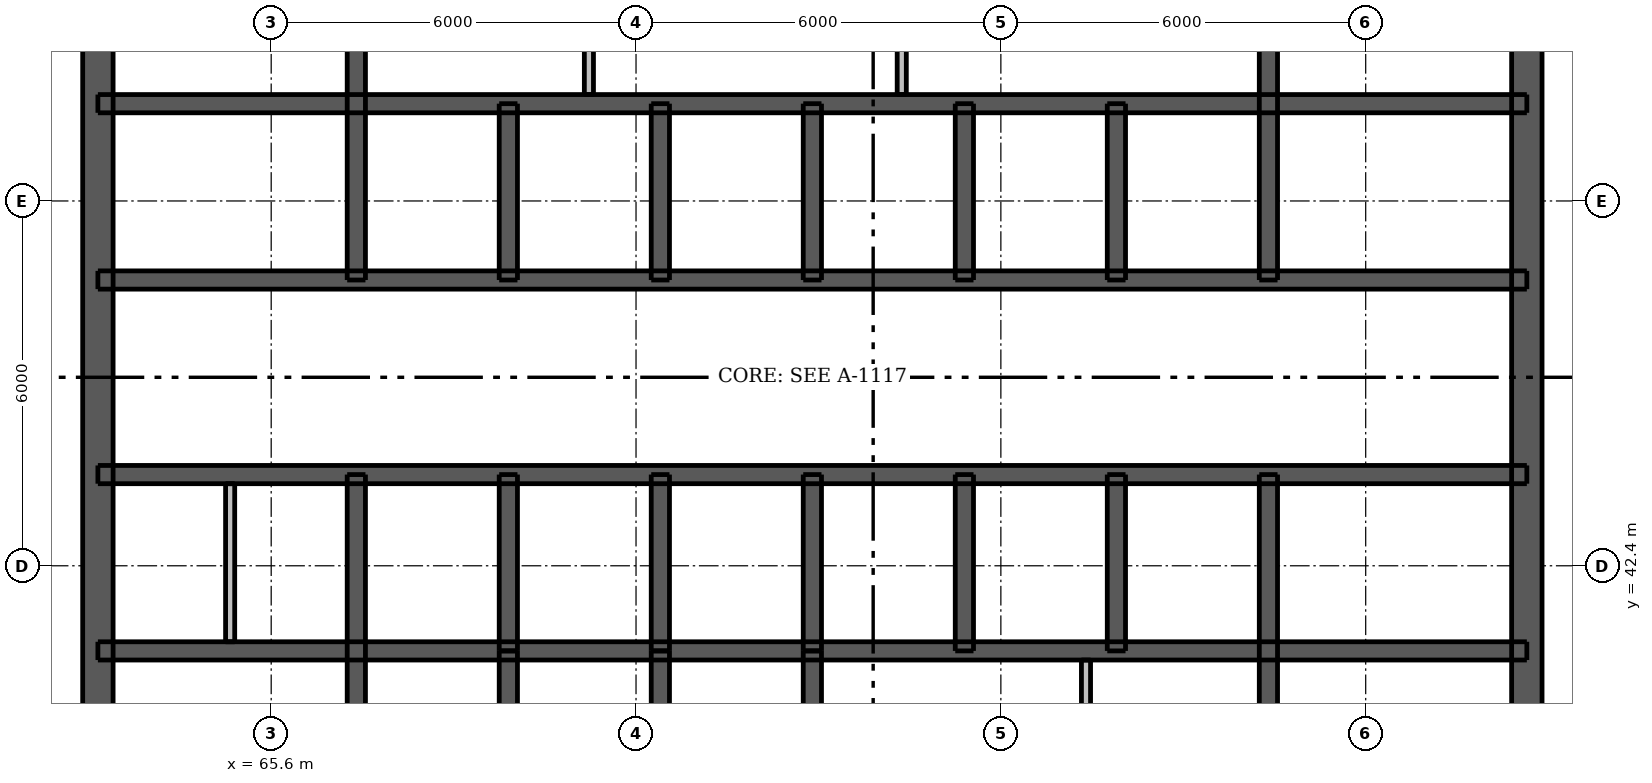
"""IFC4 building model, lengths in metres.
Left out: names, types, materials, properties, quantities, classifications, styles, units other than length and angle.
Written with IfcOpenShell. Run it as: python <this file> out.ifc"""

import sys

from ifc_helpers import new_model, si_unit, direction, frame, frame_2d, origin, place, context, subcontext, project, spatial, rectangle, extrude, element, fill, save


model = new_model("IFC4")
c1 = context("Model", 3, precision=1e-05, world=origin(), true_north=direction((0.0, 1.0)))
c2 = subcontext(c1, "Body", "Model", "MODEL_VIEW")
j1 = project(units=[si_unit("LENGTHUNIT", "METRE"), si_unit("PLANEANGLEUNIT", "RADIAN")], contexts=[c1])
p1 = place(None, origin())
s1 = spatial("IfcSite", under=j1, at=p1, CompositionType="ELEMENT")
p2 = place(p1, origin())
s2 = spatial("IfcBuilding", under=s1, at=p2, CompositionType="ELEMENT")
p3 = place(p2, frame((0.0, 0.0, 255.4)))
s3 = spatial("IfcBuildingStorey", under=s2, at=p3, CompositionType="ELEMENT", Elevation=255.4)
p4 = place(p3, frame((62.75, 33.5, 0.0), z_axis=(0.0, 0.0, 1.0), x_axis=(0.0, 1.0, 0.0)))
e1 = element("IfcWall", 1, at=p4, inside=s3, PredefinedType="SHEAR", context=c2, shape_type="SweptSolid", body=[
    extrude(rectangle(XDim=24.0, YDim=0.5, at=frame_2d((12.0, 0.0))), origin(), (0.0, 0.0, 1.0), 3.05),
])
p5 = place(p4, frame((11.2, 0.0, 0.0)))
e2 = element("IfcOpeningElement", 2, at=p5, cuts=e1, PredefinedType="OPENING", context=c2, shape_type="SweptSolid", body=[
    extrude(rectangle(XDim=1.6, YDim=2.1, at=frame_2d((0.8, 1.05))), frame((0.0, 0.26, 0.0), z_axis=(0.0, -1.0, 0.0), x_axis=(1.0, 0.0, 0.0)), (0.0, 0.0, 1.0), 0.52),
])
p6 = place(p3, frame((86.25, 33.5, 0.0), z_axis=(0.0, 0.0, 1.0), x_axis=(0.0, 1.0, 0.0)))
e3 = element("IfcWall", 3, at=p6, inside=s3, PredefinedType="SHEAR", context=c2, shape_type="SweptSolid", body=[
    extrude(rectangle(XDim=24.0, YDim=0.5, at=frame_2d((12.0, 0.0))), origin(), (0.0, 0.0, 1.0), 3.05),
])
p7 = place(p6, frame((11.2, 0.0, 0.0)))
e4 = element("IfcOpeningElement", 4, at=p7, cuts=e3, PredefinedType="OPENING", context=c2, shape_type="SweptSolid", body=[
    extrude(rectangle(XDim=1.6, YDim=2.1, at=frame_2d((0.8, 1.05))), frame((0.0, 0.26, 0.0), z_axis=(0.0, -1.0, 0.0), x_axis=(1.0, 0.0, 0.0)), (0.0, 0.0, 1.0), 0.52),
])
p8 = place(p3, frame((62.75, 41.0, 0.0), z_axis=(0.0, 0.0, 1.0), x_axis=(1.0, 0.0, 0.0)))
e5 = element("IfcWall", 5, at=p8, inside=s3, PredefinedType="SHEAR", context=c2, shape_type="SweptSolid", body=[
    extrude(rectangle(XDim=23.5, YDim=0.3, at=frame_2d((11.75, 0.0))), origin(), (0.0, 0.0, 1.0), 3.05),
])
p9 = place(p3, frame((62.75, 43.9, 0.0), z_axis=(0.0, 0.0, 1.0), x_axis=(1.0, 0.0, 0.0)))
e6 = element("IfcWall", 6, at=p9, inside=s3, PredefinedType="SHEAR", context=c2, shape_type="SweptSolid", body=[
    extrude(rectangle(XDim=23.5, YDim=0.3, at=frame_2d((11.75, 0.0))), origin(), (0.0, 0.0, 1.0), 3.05),
])
p10 = place(p9, frame((0.762, 0.0, 0.0)))
e7 = element("IfcOpeningElement", 7, at=p10, cuts=e6, PredefinedType="OPENING", context=c2, shape_type="SweptSolid", body=[
    extrude(rectangle(XDim=0.9, YDim=2.1, at=frame_2d((0.45, 1.05))), frame((0.0, 0.16, 0.0), z_axis=(0.0, -1.0, 0.0), x_axis=(1.0, 0.0, 0.0)), (0.0, 0.0, 1.0), 0.32),
])
p11 = place(p9, frame((2.688, 0.0, 0.0)))
e8 = element("IfcOpeningElement", 8, at=p11, cuts=e6, PredefinedType="OPENING", context=c2, shape_type="SweptSolid", body=[
    extrude(rectangle(XDim=0.9, YDim=2.1, at=frame_2d((0.45, 1.05))), frame((0.0, 0.16, 0.0), z_axis=(0.0, -1.0, 0.0), x_axis=(1.0, 0.0, 0.0)), (0.0, 0.0, 1.0), 0.32),
])
p12 = place(p9, frame((20.875, 0.0, 0.0)))
e9 = element("IfcOpeningElement", 9, at=p12, cuts=e6, PredefinedType="OPENING", context=c2, shape_type="SweptSolid", body=[
    extrude(rectangle(XDim=0.9, YDim=2.1, at=frame_2d((0.45, 1.05))), frame((0.0, 0.16, 0.0), z_axis=(0.0, -1.0, 0.0), x_axis=(1.0, 0.0, 0.0)), (0.0, 0.0, 1.0), 0.32),
])
p13 = place(p9, frame((5.05, 0.0, 0.0)))
e10 = element("IfcOpeningElement", 10, at=p13, cuts=e6, PredefinedType="OPENING", context=c2, shape_type="SweptSolid", body=[
    extrude(rectangle(XDim=0.9, YDim=2.1, at=frame_2d((0.45, 1.05))), frame((0.0, 0.16, 0.0), z_axis=(0.0, -1.0, 0.0), x_axis=(1.0, 0.0, 0.0)), (0.0, 0.0, 1.0), 0.32),
])
p14 = place(p9, frame((7.55, 0.0, 0.0)))
e11 = element("IfcOpeningElement", 11, at=p14, cuts=e6, PredefinedType="OPENING", context=c2, shape_type="SweptSolid", body=[
    extrude(rectangle(XDim=0.9, YDim=2.1, at=frame_2d((0.45, 1.05))), frame((0.0, 0.16, 0.0), z_axis=(0.0, -1.0, 0.0), x_axis=(1.0, 0.0, 0.0)), (0.0, 0.0, 1.0), 0.32),
])
p15 = place(p9, frame((12.55, 0.0, 0.0)))
e12 = element("IfcOpeningElement", 12, at=p15, cuts=e6, PredefinedType="OPENING", context=c2, shape_type="SweptSolid", body=[
    extrude(rectangle(XDim=0.9, YDim=2.1, at=frame_2d((0.45, 1.05))), frame((0.0, 0.16, 0.0), z_axis=(0.0, -1.0, 0.0), x_axis=(1.0, 0.0, 0.0)), (0.0, 0.0, 1.0), 0.32),
])
p16 = place(p9, frame((15.05, 0.0, 0.0)))
e13 = element("IfcOpeningElement", 13, at=p16, cuts=e6, PredefinedType="OPENING", context=c2, shape_type="SweptSolid", body=[
    extrude(rectangle(XDim=0.9, YDim=2.1, at=frame_2d((0.45, 1.05))), frame((0.0, 0.16, 0.0), z_axis=(0.0, -1.0, 0.0), x_axis=(1.0, 0.0, 0.0)), (0.0, 0.0, 1.0), 0.32),
])
p17 = place(p3, frame((62.75, 47.1, 0.0), z_axis=(0.0, 0.0, 1.0), x_axis=(1.0, 0.0, 0.0)))
e14 = element("IfcWall", 14, at=p17, inside=s3, PredefinedType="SHEAR", context=c2, shape_type="SweptSolid", body=[
    extrude(rectangle(XDim=23.5, YDim=0.3, at=frame_2d((11.75, 0.0))), origin(), (0.0, 0.0, 1.0), 3.05),
])
p18 = place(p17, frame((1.725, 0.0, 0.0)))
e15 = element("IfcOpeningElement", 15, at=p18, cuts=e14, PredefinedType="OPENING", context=c2, shape_type="SweptSolid", body=[
    extrude(rectangle(XDim=0.9, YDim=2.1, at=frame_2d((0.45, 1.05))), frame((0.0, 0.16, 0.0), z_axis=(0.0, -1.0, 0.0), x_axis=(1.0, 0.0, 0.0)), (0.0, 0.0, 1.0), 0.32),
])
p19 = place(p17, frame((20.875, 0.0, 0.0)))
e16 = element("IfcOpeningElement", 16, at=p19, cuts=e14, PredefinedType="OPENING", context=c2, shape_type="SweptSolid", body=[
    extrude(rectangle(XDim=0.9, YDim=2.1, at=frame_2d((0.45, 1.05))), frame((0.0, 0.16, 0.0), z_axis=(0.0, -1.0, 0.0), x_axis=(1.0, 0.0, 0.0)), (0.0, 0.0, 1.0), 0.32),
])
p20 = place(p17, frame((4.95, 0.0, 0.0)))
e17 = element("IfcOpeningElement", 17, at=p20, cuts=e14, PredefinedType="OPENING", context=c2, shape_type="SweptSolid", body=[
    extrude(rectangle(XDim=1.1, YDim=2.1, at=frame_2d((0.55, 1.05))), frame((0.0, 0.16, 0.0), z_axis=(0.0, -1.0, 0.0), x_axis=(1.0, 0.0, 0.0)), (0.0, 0.0, 1.0), 0.32),
])
p21 = place(p17, frame((7.45, 0.0, 0.0)))
e18 = element("IfcOpeningElement", 18, at=p21, cuts=e14, PredefinedType="OPENING", context=c2, shape_type="SweptSolid", body=[
    extrude(rectangle(XDim=1.1, YDim=2.1, at=frame_2d((0.55, 1.05))), frame((0.0, 0.16, 0.0), z_axis=(0.0, -1.0, 0.0), x_axis=(1.0, 0.0, 0.0)), (0.0, 0.0, 1.0), 0.32),
])
p22 = place(p17, frame((9.95, 0.0, 0.0)))
e19 = element("IfcOpeningElement", 19, at=p22, cuts=e14, PredefinedType="OPENING", context=c2, shape_type="SweptSolid", body=[
    extrude(rectangle(XDim=1.1, YDim=2.1, at=frame_2d((0.55, 1.05))), frame((0.0, 0.16, 0.0), z_axis=(0.0, -1.0, 0.0), x_axis=(1.0, 0.0, 0.0)), (0.0, 0.0, 1.0), 0.32),
])
p23 = place(p17, frame((12.45, 0.0, 0.0)))
e20 = element("IfcOpeningElement", 20, at=p23, cuts=e14, PredefinedType="OPENING", context=c2, shape_type="SweptSolid", body=[
    extrude(rectangle(XDim=1.1, YDim=2.1, at=frame_2d((0.55, 1.05))), frame((0.0, 0.16, 0.0), z_axis=(0.0, -1.0, 0.0), x_axis=(1.0, 0.0, 0.0)), (0.0, 0.0, 1.0), 0.32),
])
p24 = place(p17, frame((14.95, 0.0, 0.0)))
e21 = element("IfcOpeningElement", 21, at=p24, cuts=e14, PredefinedType="OPENING", context=c2, shape_type="SweptSolid", body=[
    extrude(rectangle(XDim=1.1, YDim=2.1, at=frame_2d((0.55, 1.05))), frame((0.0, 0.16, 0.0), z_axis=(0.0, -1.0, 0.0), x_axis=(1.0, 0.0, 0.0)), (0.0, 0.0, 1.0), 0.32),
])
p25 = place(p17, frame((17.45, 0.0, 0.0)))
e22 = element("IfcOpeningElement", 22, at=p25, cuts=e14, PredefinedType="OPENING", context=c2, shape_type="SweptSolid", body=[
    extrude(rectangle(XDim=1.1, YDim=2.1, at=frame_2d((0.55, 1.05))), frame((0.0, 0.16, 0.0), z_axis=(0.0, -1.0, 0.0), x_axis=(1.0, 0.0, 0.0)), (0.0, 0.0, 1.0), 0.32),
])
p26 = place(p3, frame((62.75, 50.0, 0.0), z_axis=(0.0, 0.0, 1.0), x_axis=(1.0, 0.0, 0.0)))
e23 = element("IfcWall", 23, at=p26, inside=s3, PredefinedType="SHEAR", context=c2, shape_type="SweptSolid", body=[
    extrude(rectangle(XDim=23.5, YDim=0.3, at=frame_2d((11.75, 0.0))), origin(), (0.0, 0.0, 1.0), 3.05),
])
p27 = place(p3, frame((67.0, 33.75, 0.0), z_axis=(0.0, 0.0, 1.0), x_axis=(0.0, 1.0, 0.0)))
e24 = element("IfcWall", 24, at=p27, inside=s3, PredefinedType="SHEAR", context=c2, shape_type="SweptSolid", body=[
    extrude(rectangle(XDim=10.15, YDim=0.3, at=frame_2d((5.075, 0.0))), origin(), (0.0, 0.0, 1.0), 3.05),
])
p28 = place(p27, frame((0.45, 0.0, 0.0)))
e25 = element("IfcOpeningElement", 25, at=p28, cuts=e24, PredefinedType="OPENING", context=c2, shape_type="SweptSolid", body=[
    extrude(rectangle(XDim=1.1, YDim=2.1, at=frame_2d((0.55, 1.05))), frame((0.0, 0.16, 0.0), z_axis=(0.0, -1.0, 0.0), x_axis=(1.0, 0.0, 0.0)), (0.0, 0.0, 1.0), 0.32),
])
for number, where, z_axis, x_axis in (
    (26, (67.0, 47.1, 0.0), (0.0, 0.0, 1.0), (0.0, 1.0, 0.0)),
    (27, (82.0, 33.75, 0.0), (0.0, 0.0, 1.0), (0.0, 1.0, 0.0)),
    (28, (82.0, 47.1, 0.0), (0.0, 0.0, 1.0), (0.0, 1.0, 0.0)),
):
    element("IfcWall", number, at=place(p3, frame(where, z_axis=z_axis, x_axis=x_axis)), inside=s3, PredefinedType="SHEAR", context=c2, shape_type="SweptSolid", body=[
        extrude(rectangle(XDim=10.15, YDim=0.3, at=frame_2d((5.075, 0.0))), origin(), (0.0, 0.0, 1.0), 3.05),
    ])
for number, where, z_axis, x_axis in (
    (29, (69.5, 41.0, 0.0), (0.0, 0.0, 1.0), (0.0, 1.0, 0.0)),
    (30, (69.5, 47.1, 0.0), (0.0, 0.0, 1.0), (0.0, 1.0, 0.0)),
    (31, (72.0, 41.0, 0.0), (0.0, 0.0, 1.0), (0.0, 1.0, 0.0)),
    (32, (72.0, 47.1, 0.0), (0.0, 0.0, 1.0), (0.0, 1.0, 0.0)),
    (33, (74.5, 41.0, 0.0), (0.0, 0.0, 1.0), (0.0, 1.0, 0.0)),
    (34, (74.5, 47.1, 0.0), (0.0, 0.0, 1.0), (0.0, 1.0, 0.0)),
    (35, (77.0, 41.0, 0.0), (0.0, 0.0, 1.0), (0.0, 1.0, 0.0)),
    (36, (77.0, 47.1, 0.0), (0.0, 0.0, 1.0), (0.0, 1.0, 0.0)),
    (37, (79.5, 41.0, 0.0), (0.0, 0.0, 1.0), (0.0, 1.0, 0.0)),
    (38, (79.5, 47.1, 0.0), (0.0, 0.0, 1.0), (0.0, 1.0, 0.0)),
    (39, (69.5, 38.1, 0.0), (0.0, 0.0, 1.0), (0.0, 1.0, 0.0)),
    (40, (72.0, 38.1, 0.0), (0.0, 0.0, 1.0), (0.0, 1.0, 0.0)),
    (41, (74.5, 38.1, 0.0), (0.0, 0.0, 1.0), (0.0, 1.0, 0.0)),
):
    element("IfcWall", number, at=place(p3, frame(where, z_axis=z_axis, x_axis=x_axis)), inside=s3, PredefinedType="SHEAR", context=c2, shape_type="SweptSolid", body=[
        extrude(rectangle(XDim=2.9, YDim=0.3, at=frame_2d((1.45, 0.0))), origin(), (0.0, 0.0, 1.0), 3.05),
    ])
p29 = place(p3, frame((79.0, 34.0, 0.0), z_axis=(0.0, 0.0, 1.0), x_axis=(0.0, 1.0, 0.0)))
e42 = element("IfcWall", 42, at=p29, inside=s3, PredefinedType="PLUMBINGWALL", context=c2, shape_type="SweptSolid", body=[
    extrude(rectangle(XDim=6.85, YDim=0.15, at=frame_2d((3.425, 0.0))), origin(), (0.0, 0.0, 1.0), 3.05),
])
p30 = place(p3, frame((64.925, 41.15, 0.0), z_axis=(0.0, 0.0, 1.0), x_axis=(0.0, 1.0, 0.0)))
e43 = element("IfcWall", 43, at=p30, inside=s3, PredefinedType="PLUMBINGWALL", context=c2, shape_type="SweptSolid", body=[
    extrude(rectangle(XDim=2.6, YDim=0.15, at=frame_2d((1.3, 0.0))), origin(), (0.0, 0.0, 1.0), 3.05),
])
for number, where, z_axis, x_axis in (
    (44, (70.825, 50.15, 0.0), (0.0, 0.0, 1.0), (0.0, 1.0, 0.0)),
    (45, (75.97, 50.15, 0.0), (0.0, 0.0, 1.0), (0.0, 1.0, 0.0)),
):
    element("IfcWall", number, at=place(p3, frame(where, z_axis=z_axis, x_axis=x_axis)), inside=s3, PredefinedType="PLUMBINGWALL", context=c2, shape_type="SweptSolid", body=[
        extrude(rectangle(XDim=6.85, YDim=0.15, at=frame_2d((3.425, 0.0))), origin(), (0.0, 0.0, 1.0), 3.05),
    ])
p31 = place(p5, origin())
e46 = element("IfcDoor", 46, at=p31, inside=s3, OperationType="DOUBLE_DOOR_SINGLE_SWING", PredefinedType="DOOR", context=c2, shape_type="SweptSolid", body=[
    extrude(rectangle(XDim=1.6, YDim=2.1, at=frame_2d((0.8, 1.05))), frame((0.0, -0.188, 0.0), z_axis=(0.0, -1.0, 0.0), x_axis=(1.0, 0.0, 0.0)), (0.0, 0.0, 1.0), 0.05),
])
fill(e2, e46)
p32 = place(p7, origin())
e47 = element("IfcDoor", 47, at=p32, inside=s3, OperationType="DOUBLE_DOOR_SINGLE_SWING", PredefinedType="DOOR", context=c2, shape_type="SweptSolid", body=[
    extrude(rectangle(XDim=1.6, YDim=2.1, at=frame_2d((0.8, 1.05))), frame((0.0, 0.237, 0.0), z_axis=(0.0, -1.0, 0.0), x_axis=(1.0, 0.0, 0.0)), (0.0, 0.0, 1.0), 0.05),
])
fill(e4, e47)
p33 = place(p10, origin())
e48 = element("IfcDoor", 48, at=p33, inside=s3, OperationType="SINGLE_SWING_LEFT", PredefinedType="DOOR", context=c2, shape_type="SweptSolid", body=[
    extrude(rectangle(XDim=0.9, YDim=2.1, at=frame_2d((0.45, 1.05))), frame((0.0, -0.087, 0.0), z_axis=(0.0, -1.0, 0.0), x_axis=(1.0, 0.0, 0.0)), (0.0, 0.0, 1.0), 0.05),
])
fill(e7, e48)
p34 = place(p11, origin())
e49 = element("IfcDoor", 49, at=p34, inside=s3, OperationType="SINGLE_SWING_RIGHT", PredefinedType="DOOR", context=c2, shape_type="SweptSolid", body=[
    extrude(rectangle(XDim=0.9, YDim=2.1, at=frame_2d((0.45, 1.05))), frame((0.0, -0.087, 0.0), z_axis=(0.0, -1.0, 0.0), x_axis=(1.0, 0.0, 0.0)), (0.0, 0.0, 1.0), 0.05),
])
fill(e8, e49)
p35 = place(p12, origin())
e50 = element("IfcDoor", 50, at=p35, inside=s3, OperationType="SINGLE_SWING_LEFT", PredefinedType="DOOR", context=c2, shape_type="SweptSolid", body=[
    extrude(rectangle(XDim=0.9, YDim=2.1, at=frame_2d((0.45, 1.05))), frame((0.0, -0.087, 0.0), z_axis=(0.0, -1.0, 0.0), x_axis=(1.0, 0.0, 0.0)), (0.0, 0.0, 1.0), 0.05),
])
fill(e9, e50)
p36 = place(p18, origin())
e51 = element("IfcDoor", 51, at=p36, inside=s3, OperationType="SINGLE_SWING_LEFT", PredefinedType="DOOR", context=c2, shape_type="SweptSolid", body=[
    extrude(rectangle(XDim=0.9, YDim=2.1, at=frame_2d((0.45, 1.05))), frame((0.0, 0.138, 0.0), z_axis=(0.0, -1.0, 0.0), x_axis=(1.0, 0.0, 0.0)), (0.0, 0.0, 1.0), 0.05),
])
fill(e15, e51)
p37 = place(p19, origin())
e52 = element("IfcDoor", 52, at=p37, inside=s3, OperationType="SINGLE_SWING_LEFT", PredefinedType="DOOR", context=c2, shape_type="SweptSolid", body=[
    extrude(rectangle(XDim=0.9, YDim=2.1, at=frame_2d((0.45, 1.05))), frame((0.0, 0.138, 0.0), z_axis=(0.0, -1.0, 0.0), x_axis=(1.0, 0.0, 0.0)), (0.0, 0.0, 1.0), 0.05),
])
fill(e16, e52)
p38 = place(p13, origin())
e53 = element("IfcDoor", 53, at=p38, inside=s3, OperationType="SINGLE_SWING_RIGHT", PredefinedType="DOOR", context=c2, shape_type="SweptSolid", body=[
    extrude(rectangle(XDim=0.9, YDim=2.1, at=frame_2d((0.45, 1.05))), frame((0.0, -0.087, 0.0), z_axis=(0.0, -1.0, 0.0), x_axis=(1.0, 0.0, 0.0)), (0.0, 0.0, 1.0), 0.05),
])
fill(e10, e53)
p39 = place(p14, origin())
e54 = element("IfcDoor", 54, at=p39, inside=s3, OperationType="SINGLE_SWING_LEFT", PredefinedType="DOOR", context=c2, shape_type="SweptSolid", body=[
    extrude(rectangle(XDim=0.9, YDim=2.1, at=frame_2d((0.45, 1.05))), frame((0.0, -0.087, 0.0), z_axis=(0.0, -1.0, 0.0), x_axis=(1.0, 0.0, 0.0)), (0.0, 0.0, 1.0), 0.05),
])
fill(e11, e54)
p40 = place(p15, origin())
e55 = element("IfcDoor", 55, at=p40, inside=s3, OperationType="SINGLE_SWING_LEFT", PredefinedType="DOOR", context=c2, shape_type="SweptSolid", body=[
    extrude(rectangle(XDim=0.9, YDim=2.1, at=frame_2d((0.45, 1.05))), frame((0.0, -0.087, 0.0), z_axis=(0.0, -1.0, 0.0), x_axis=(1.0, 0.0, 0.0)), (0.0, 0.0, 1.0), 0.05),
])
fill(e12, e55)
p41 = place(p16, origin())
e56 = element("IfcDoor", 56, at=p41, inside=s3, OperationType="SINGLE_SWING_RIGHT", PredefinedType="DOOR", context=c2, shape_type="SweptSolid", body=[
    extrude(rectangle(XDim=0.9, YDim=2.1, at=frame_2d((0.45, 1.05))), frame((0.0, -0.087, 0.0), z_axis=(0.0, -1.0, 0.0), x_axis=(1.0, 0.0, 0.0)), (0.0, 0.0, 1.0), 0.05),
])
fill(e13, e56)
p42 = place(p20, origin())
e57 = element("IfcDoor", 57, at=p42, inside=s3, OperationType="DOUBLE_DOOR_SLIDING", PredefinedType="DOOR", context=c2, shape_type="SweptSolid", body=[
    extrude(rectangle(XDim=1.1, YDim=2.1, at=frame_2d((0.55, 1.05))), frame((0.0, 0.025, 0.0), z_axis=(0.0, -1.0, 0.0), x_axis=(1.0, 0.0, 0.0)), (0.0, 0.0, 1.0), 0.05),
])
fill(e17, e57)
p43 = place(p21, origin())
e58 = element("IfcDoor", 58, at=p43, inside=s3, OperationType="DOUBLE_DOOR_SLIDING", PredefinedType="DOOR", context=c2, shape_type="SweptSolid", body=[
    extrude(rectangle(XDim=1.1, YDim=2.1, at=frame_2d((0.55, 1.05))), frame((0.0, 0.025, 0.0), z_axis=(0.0, -1.0, 0.0), x_axis=(1.0, 0.0, 0.0)), (0.0, 0.0, 1.0), 0.05),
])
fill(e18, e58)
p44 = place(p22, origin())
e59 = element("IfcDoor", 59, at=p44, inside=s3, OperationType="DOUBLE_DOOR_SLIDING", PredefinedType="DOOR", context=c2, shape_type="SweptSolid", body=[
    extrude(rectangle(XDim=1.1, YDim=2.1, at=frame_2d((0.55, 1.05))), frame((0.0, 0.025, 0.0), z_axis=(0.0, -1.0, 0.0), x_axis=(1.0, 0.0, 0.0)), (0.0, 0.0, 1.0), 0.05),
])
fill(e19, e59)
p45 = place(p23, origin())
e60 = element("IfcDoor", 60, at=p45, inside=s3, OperationType="DOUBLE_DOOR_SLIDING", PredefinedType="DOOR", context=c2, shape_type="SweptSolid", body=[
    extrude(rectangle(XDim=1.1, YDim=2.1, at=frame_2d((0.55, 1.05))), frame((0.0, 0.025, 0.0), z_axis=(0.0, -1.0, 0.0), x_axis=(1.0, 0.0, 0.0)), (0.0, 0.0, 1.0), 0.05),
])
fill(e20, e60)
p46 = place(p24, origin())
e61 = element("IfcDoor", 61, at=p46, inside=s3, OperationType="DOUBLE_DOOR_SLIDING", PredefinedType="DOOR", context=c2, shape_type="SweptSolid", body=[
    extrude(rectangle(XDim=1.1, YDim=2.1, at=frame_2d((0.55, 1.05))), frame((0.0, 0.025, 0.0), z_axis=(0.0, -1.0, 0.0), x_axis=(1.0, 0.0, 0.0)), (0.0, 0.0, 1.0), 0.05),
])
fill(e21, e61)
p47 = place(p25, origin())
e62 = element("IfcDoor", 62, at=p47, inside=s3, OperationType="DOUBLE_DOOR_SLIDING", PredefinedType="DOOR", context=c2, shape_type="SweptSolid", body=[
    extrude(rectangle(XDim=1.1, YDim=2.1, at=frame_2d((0.55, 1.05))), frame((0.0, 0.025, 0.0), z_axis=(0.0, -1.0, 0.0), x_axis=(1.0, 0.0, 0.0)), (0.0, 0.0, 1.0), 0.05),
])
fill(e22, e62)
save(model, sys.argv[1])
